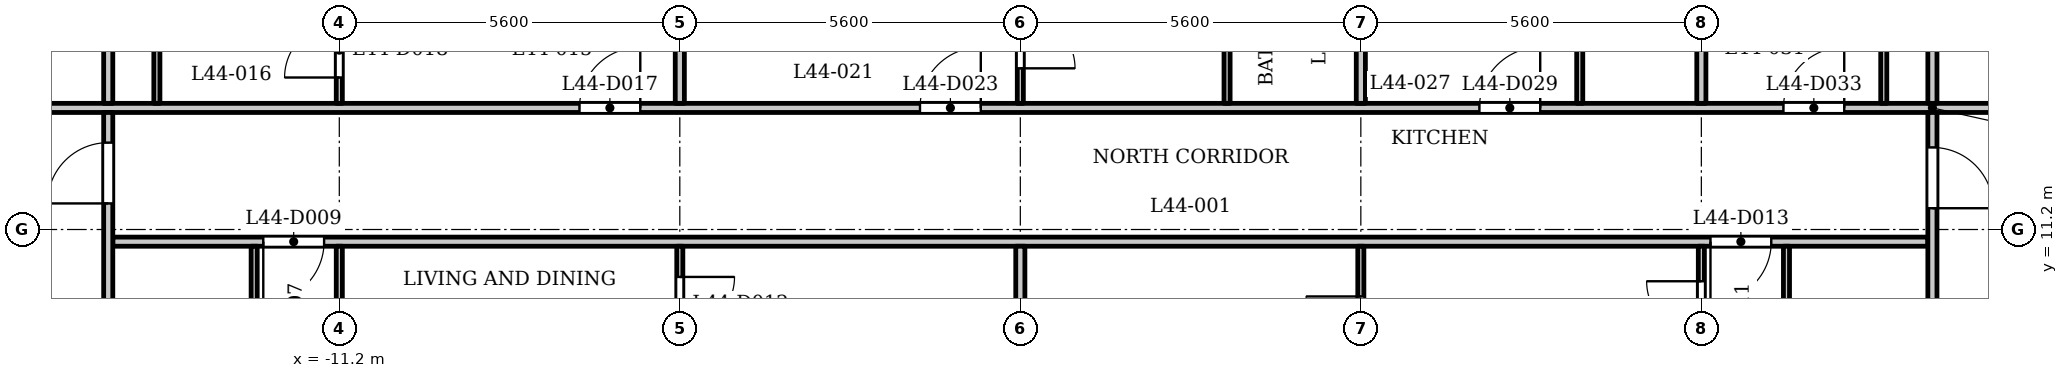
"""IFC4 building model, lengths in metres.
Left out: names, types, materials, properties, quantities, classifications, styles, units other than length and angle.
Written with IfcOpenShell. Run it as: python <this file> out.ifc"""

import sys

from ifc_helpers import new_model, si_unit, direction, frame, frame_2d, origin, place, context, subcontext, project, spatial, rectangle, extrude, element, fill, save


model = new_model("IFC4")
c1 = context("Model", 3, precision=1e-05, world=origin(), true_north=direction((0.0, 1.0)))
c2 = subcontext(c1, "Body", "Model", "MODEL_VIEW")
j1 = project(units=[si_unit("LENGTHUNIT", "METRE"), si_unit("PLANEANGLEUNIT", "RADIAN")], contexts=[c1])
p1 = place(None, origin())
s1 = spatial("IfcSite", under=j1, at=p1, CompositionType="ELEMENT")
p2 = place(p1, origin())
s2 = spatial("IfcBuilding", under=s1, at=p2, CompositionType="ELEMENT")
p3 = place(p2, frame((0.0, 0.0, 171.1)))
s3 = spatial("IfcBuildingStorey", under=s2, at=p3, CompositionType="ELEMENT", Elevation=171.1)
p4 = place(p3, frame((-14.925, 11.0, 0.0), z_axis=(0.0, 0.0, 1.0), x_axis=(1.0, 0.0, 0.0)))
e1 = element("IfcWall", 1, at=p4, inside=s3, PredefinedType="PARTITIONING", context=c2, shape_type="SweptSolid", body=[
    extrude(rectangle(XDim=29.85, YDim=0.15, at=frame_2d((14.925, 0.0))), origin(), (0.0, 0.0, 1.0), 3.2),
])
p5 = place(p4, frame((2.475, 0.0, 0.0)))
e2 = element("IfcOpeningElement", 2, at=p5, cuts=e1, PredefinedType="OPENING", context=c2, shape_type="SweptSolid", body=[
    extrude(rectangle(XDim=1.0, YDim=2.1, at=frame_2d((0.5, 1.05))), frame((0.0, 0.085, 0.0), z_axis=(0.0, -1.0, 0.0), x_axis=(1.0, 0.0, 0.0)), (0.0, 0.0, 1.0), 0.17),
])
p6 = place(p4, frame((26.275, 0.0, 0.0)))
e3 = element("IfcOpeningElement", 3, at=p6, cuts=e1, PredefinedType="OPENING", context=c2, shape_type="SweptSolid", body=[
    extrude(rectangle(XDim=1.0, YDim=2.1, at=frame_2d((0.5, 1.05))), frame((0.0, 0.085, 0.0), z_axis=(0.0, -1.0, 0.0), x_axis=(1.0, 0.0, 0.0)), (0.0, 0.0, 1.0), 0.17),
])
p7 = place(p3, frame((-17.4, 13.2, 0.0), z_axis=(0.0, 0.0, 1.0), x_axis=(1.0, 0.0, 0.0)))
e4 = element("IfcWall", 4, at=p7, inside=s3, PredefinedType="PARTITIONING", context=c2, shape_type="SweptSolid", body=[
    extrude(rectangle(XDim=34.8, YDim=0.15, at=frame_2d((17.4, 0.0))), origin(), (0.0, 0.0, 1.0), 3.2),
])
p8 = place(p7, frame((0.25, 0.0, 0.0)))
e5 = element("IfcOpeningElement", 5, at=p8, cuts=e4, PredefinedType="OPENING", context=c2, shape_type="SweptSolid", body=[
    extrude(rectangle(XDim=1.0, YDim=2.1, at=frame_2d((0.5, 1.05))), frame((0.0, 0.085, 0.0), z_axis=(0.0, -1.0, 0.0), x_axis=(1.0, 0.0, 0.0)), (0.0, 0.0, 1.0), 0.17),
])
p9 = place(p7, frame((33.65, 0.0, 0.0)))
e6 = element("IfcOpeningElement", 6, at=p9, cuts=e4, PredefinedType="OPENING", context=c2, shape_type="SweptSolid", body=[
    extrude(rectangle(XDim=1.0, YDim=2.1, at=frame_2d((0.5, 1.05))), frame((0.0, 0.085, 0.0), z_axis=(0.0, -1.0, 0.0), x_axis=(1.0, 0.0, 0.0)), (0.0, 0.0, 1.0), 0.17),
])
p10 = place(p7, frame((10.15, 0.0, 0.0)))
e7 = element("IfcOpeningElement", 7, at=p10, cuts=e4, PredefinedType="OPENING", context=c2, shape_type="SweptSolid", body=[
    extrude(rectangle(XDim=1.0, YDim=2.1, at=frame_2d((0.5, 1.05))), frame((0.0, 0.085, 0.0), z_axis=(0.0, -1.0, 0.0), x_axis=(1.0, 0.0, 0.0)), (0.0, 0.0, 1.0), 0.17),
])
p11 = place(p7, frame((15.75, 0.0, 0.0)))
e8 = element("IfcOpeningElement", 8, at=p11, cuts=e4, PredefinedType="OPENING", context=c2, shape_type="SweptSolid", body=[
    extrude(rectangle(XDim=1.0, YDim=2.1, at=frame_2d((0.5, 1.05))), frame((0.0, 0.085, 0.0), z_axis=(0.0, -1.0, 0.0), x_axis=(1.0, 0.0, 0.0)), (0.0, 0.0, 1.0), 0.17),
])
p12 = place(p7, frame((24.95, 0.0, 0.0)))
e9 = element("IfcOpeningElement", 9, at=p12, cuts=e4, PredefinedType="OPENING", context=c2, shape_type="SweptSolid", body=[
    extrude(rectangle(XDim=1.0, YDim=2.1, at=frame_2d((0.5, 1.05))), frame((0.0, 0.085, 0.0), z_axis=(0.0, -1.0, 0.0), x_axis=(1.0, 0.0, 0.0)), (0.0, 0.0, 1.0), 0.17),
])
p13 = place(p7, frame((29.95, 0.0, 0.0)))
e10 = element("IfcOpeningElement", 10, at=p13, cuts=e4, PredefinedType="OPENING", context=c2, shape_type="SweptSolid", body=[
    extrude(rectangle(XDim=1.0, YDim=2.1, at=frame_2d((0.5, 1.05))), frame((0.0, 0.085, 0.0), z_axis=(0.0, -1.0, 0.0), x_axis=(1.0, 0.0, 0.0)), (0.0, 0.0, 1.0), 0.17),
])
p14 = place(p3, frame((-15.0, 6.769, 0.0), z_axis=(0.0, 0.0, 1.0), x_axis=(0.0, 1.0, 0.0)))
e11 = element("IfcWall", 11, at=p14, inside=s3, PredefinedType="PARTITIONING", context=c2, shape_type="SweptSolid", body=[
    extrude(rectangle(XDim=6.356, YDim=0.15, at=frame_2d((3.178, 0.0))), origin(), (0.0, 0.0, 1.0), 3.2),
])
p15 = place(p14, frame((4.86, 0.0, 0.0)))
e12 = element("IfcOpeningElement", 12, at=p15, cuts=e11, PredefinedType="OPENING", context=c2, shape_type="SweptSolid", body=[
    extrude(rectangle(XDim=1.0, YDim=2.1, at=frame_2d((0.5, 1.05))), frame((0.0, 0.085, 0.0), z_axis=(0.0, -1.0, 0.0), x_axis=(1.0, 0.0, 0.0)), (0.0, 0.0, 1.0), 0.17),
])
p16 = place(p3, frame((-15.0, 13.275, 0.0), z_axis=(0.0, 0.0, 1.0), x_axis=(0.0, 1.0, 0.0)))
e13 = element("IfcWall", 13, at=p16, inside=s3, PredefinedType="PARTITIONING", context=c2, shape_type="SweptSolid", body=[
    extrude(rectangle(XDim=2.05, YDim=0.15, at=frame_2d((1.025, 0.0))), origin(), (0.0, 0.0, 1.0), 3.2),
])
p17 = place(p3, frame((-14.2, 13.275, 0.0), z_axis=(0.0, 0.0, 1.0), x_axis=(0.0, 1.0, 0.0)))
e14 = element("IfcWall", 14, at=p17, inside=s3, PredefinedType="PARTITIONING", context=c2, shape_type="SweptSolid", body=[
    extrude(rectangle(XDim=3.175, YDim=0.1, at=frame_2d((1.587, 0.0))), origin(), (0.0, 0.0, 1.0), 3.2),
])
p18 = place(p3, frame((-12.6, 7.32, 0.0), z_axis=(0.0, 0.0, 1.0), x_axis=(0.0, 1.0, 0.0)))
e15 = element("IfcWall", 15, at=p18, inside=s3, PredefinedType="PARTITIONING", context=c2, shape_type="SweptSolid", body=[
    extrude(rectangle(XDim=3.605, YDim=0.1, at=frame_2d((1.802, 0.0))), origin(), (0.0, 0.0, 1.0), 3.2),
])
p19 = place(p18, frame((1.729, 0.0, 0.0)))
e16 = element("IfcOpeningElement", 16, at=p19, cuts=e15, PredefinedType="OPENING", context=c2, shape_type="SweptSolid", body=[
    extrude(rectangle(XDim=0.8, YDim=2.1, at=frame_2d((0.4, 1.05))), frame((0.0, 0.06, 0.0), z_axis=(0.0, -1.0, 0.0), x_axis=(1.0, 0.0, 0.0)), (0.0, 0.0, 1.0), 0.12),
])
p20 = place(p3, frame((-11.2, 7.32, 0.0), z_axis=(0.0, 0.0, 1.0), x_axis=(0.0, 1.0, 0.0)))
e17 = element("IfcWall", 17, at=p20, inside=s3, PredefinedType="PARTITIONING", context=c2, shape_type="SweptSolid", body=[
    extrude(rectangle(XDim=3.605, YDim=0.1, at=frame_2d((1.802, 0.0))), origin(), (0.0, 0.0, 1.0), 3.2),
])
p21 = place(p20, frame((1.7, 0.0, 0.0)))
e18 = element("IfcOpeningElement", 18, at=p21, cuts=e17, PredefinedType="OPENING", context=c2, shape_type="SweptSolid", body=[
    extrude(rectangle(XDim=0.9, YDim=2.1, at=frame_2d((0.45, 1.05))), frame((0.0, 0.06, 0.0), z_axis=(0.0, -1.0, 0.0), x_axis=(1.0, 0.0, 0.0)), (0.0, 0.0, 1.0), 0.12),
])
p22 = place(p3, frame((-11.2, 13.275, 0.0), z_axis=(0.0, 0.0, 1.0), x_axis=(0.0, 1.0, 0.0)))
e19 = element("IfcWall", 19, at=p22, inside=s3, PredefinedType="PARTITIONING", context=c2, shape_type="SweptSolid", body=[
    extrude(rectangle(XDim=3.175, YDim=0.1, at=frame_2d((1.587, 0.0))), origin(), (0.0, 0.0, 1.0), 3.2),
])
p23 = place(p22, frame((0.425, 0.0, 0.0)))
e20 = element("IfcOpeningElement", 20, at=p23, cuts=e19, PredefinedType="OPENING", context=c2, shape_type="SweptSolid", body=[
    extrude(rectangle(XDim=0.9, YDim=2.1, at=frame_2d((0.45, 1.05))), frame((0.0, 0.06, 0.0), z_axis=(0.0, -1.0, 0.0), x_axis=(1.0, 0.0, 0.0)), (0.0, 0.0, 1.0), 0.12),
])
p24 = place(p3, frame((-5.6, 7.32, 0.0), z_axis=(0.0, 0.0, 1.0), x_axis=(0.0, 1.0, 0.0)))
e21 = element("IfcWall", 21, at=p24, inside=s3, PredefinedType="PARTITIONING", context=c2, shape_type="SweptSolid", body=[
    extrude(rectangle(XDim=3.605, YDim=0.1, at=frame_2d((1.802, 0.0))), origin(), (0.0, 0.0, 1.0), 3.2),
])
p25 = place(p24, frame((2.2, 0.0, 0.0)))
e22 = element("IfcOpeningElement", 22, at=p25, cuts=e21, PredefinedType="OPENING", context=c2, shape_type="SweptSolid", body=[
    extrude(rectangle(XDim=0.9, YDim=2.1, at=frame_2d((0.45, 1.05))), frame((0.0, 0.06, 0.0), z_axis=(0.0, -1.0, 0.0), x_axis=(1.0, 0.0, 0.0)), (0.0, 0.0, 1.0), 0.12),
])
p26 = place(p3, frame((-5.6, 13.275, 0.0), z_axis=(0.0, 0.0, 1.0), x_axis=(0.0, 1.0, 0.0)))
e23 = element("IfcWall", 23, at=p26, inside=s3, PredefinedType="PARTITIONING", context=c2, shape_type="SweptSolid", body=[
    extrude(rectangle(XDim=3.175, YDim=0.15, at=frame_2d((1.587, 0.0))), origin(), (0.0, 0.0, 1.0), 3.2),
])
p27 = place(p3, frame((0.0, 13.275, 0.0), z_axis=(0.0, 0.0, 1.0), x_axis=(0.0, 1.0, 0.0)))
e24 = element("IfcWall", 24, at=p27, inside=s3, PredefinedType="PARTITIONING", context=c2, shape_type="SweptSolid", body=[
    extrude(rectangle(XDim=3.175, YDim=0.1, at=frame_2d((1.587, 0.0))), origin(), (0.0, 0.0, 1.0), 3.2),
])
p28 = place(p27, frame((0.576, 0.0, 0.0)))
e25 = element("IfcOpeningElement", 25, at=p28, cuts=e24, PredefinedType="OPENING", context=c2, shape_type="SweptSolid", body=[
    extrude(rectangle(XDim=0.9, YDim=2.1, at=frame_2d((0.45, 1.05))), frame((0.0, 0.06, 0.0), z_axis=(0.0, -1.0, 0.0), x_axis=(1.0, 0.0, 0.0)), (0.0, 0.0, 1.0), 0.12),
])
p29 = place(p3, frame((0.0, 7.32, 0.0), z_axis=(0.0, 0.0, 1.0), x_axis=(0.0, 1.0, 0.0)))
e26 = element("IfcWall", 26, at=p29, inside=s3, PredefinedType="PARTITIONING", context=c2, shape_type="SweptSolid", body=[
    extrude(rectangle(XDim=3.605, YDim=0.15, at=frame_2d((1.802, 0.0))), origin(), (0.0, 0.0, 1.0), 3.2),
])
p30 = place(p3, frame((3.4, 13.275, 0.0), z_axis=(0.0, 0.0, 1.0), x_axis=(0.0, 1.0, 0.0)))
e27 = element("IfcWall", 27, at=p30, inside=s3, PredefinedType="PARTITIONING", context=c2, shape_type="SweptSolid", body=[
    extrude(rectangle(XDim=3.175, YDim=0.1, at=frame_2d((1.587, 0.0))), origin(), (0.0, 0.0, 1.0), 3.2),
])
p31 = place(p3, frame((5.6, 7.32, 0.0), z_axis=(0.0, 0.0, 1.0), x_axis=(0.0, 1.0, 0.0)))
e28 = element("IfcWall", 28, at=p31, inside=s3, PredefinedType="PARTITIONING", context=c2, shape_type="SweptSolid", body=[
    extrude(rectangle(XDim=3.605, YDim=0.1, at=frame_2d((1.802, 0.0))), origin(), (0.0, 0.0, 1.0), 3.2),
])
p32 = place(p31, frame((1.879, 0.0, 0.0)))
e29 = element("IfcOpeningElement", 29, at=p32, cuts=e28, PredefinedType="OPENING", context=c2, shape_type="SweptSolid", body=[
    extrude(rectangle(XDim=0.9, YDim=2.1, at=frame_2d((0.45, 1.05))), frame((0.0, 0.06, 0.0), z_axis=(0.0, -1.0, 0.0), x_axis=(1.0, 0.0, 0.0)), (0.0, 0.0, 1.0), 0.12),
])
p33 = place(p3, frame((5.6, 13.275, 0.0), z_axis=(0.0, 0.0, 1.0), x_axis=(0.0, 1.0, 0.0)))
e30 = element("IfcWall", 30, at=p33, inside=s3, PredefinedType="PARTITIONING", context=c2, shape_type="SweptSolid", body=[
    extrude(rectangle(XDim=3.175, YDim=0.15, at=frame_2d((1.587, 0.0))), origin(), (0.0, 0.0, 1.0), 3.2),
])
p34 = place(p3, frame((9.2, 13.275, 0.0), z_axis=(0.0, 0.0, 1.0), x_axis=(0.0, 1.0, 0.0)))
e31 = element("IfcWall", 31, at=p34, inside=s3, PredefinedType="PARTITIONING", context=c2, shape_type="SweptSolid", body=[
    extrude(rectangle(XDim=3.175, YDim=0.1, at=frame_2d((1.587, 0.0))), origin(), (0.0, 0.0, 1.0), 3.2),
])
p35 = place(p3, frame((11.2, 7.32, 0.0), z_axis=(0.0, 0.0, 1.0), x_axis=(0.0, 1.0, 0.0)))
e32 = element("IfcWall", 32, at=p35, inside=s3, PredefinedType="PARTITIONING", context=c2, shape_type="SweptSolid", body=[
    extrude(rectangle(XDim=3.605, YDim=0.1, at=frame_2d((1.802, 0.0))), origin(), (0.0, 0.0, 1.0), 3.2),
])
p36 = place(p35, frame((2.129, 0.0, 0.0)))
e33 = element("IfcOpeningElement", 33, at=p36, cuts=e32, PredefinedType="OPENING", context=c2, shape_type="SweptSolid", body=[
    extrude(rectangle(XDim=0.9, YDim=2.1, at=frame_2d((0.45, 1.05))), frame((0.0, 0.06, 0.0), z_axis=(0.0, -1.0, 0.0), x_axis=(1.0, 0.0, 0.0)), (0.0, 0.0, 1.0), 0.12),
])
p37 = place(p3, frame((11.2, 13.275, 0.0), z_axis=(0.0, 0.0, 1.0), x_axis=(0.0, 1.0, 0.0)))
e34 = element("IfcWall", 34, at=p37, inside=s3, PredefinedType="PARTITIONING", context=c2, shape_type="SweptSolid", body=[
    extrude(rectangle(XDim=3.175, YDim=0.15, at=frame_2d((1.587, 0.0))), origin(), (0.0, 0.0, 1.0), 3.2),
])
p38 = place(p3, frame((12.6, 7.32, 0.0), z_axis=(0.0, 0.0, 1.0), x_axis=(0.0, 1.0, 0.0)))
e35 = element("IfcWall", 35, at=p38, inside=s3, PredefinedType="PARTITIONING", context=c2, shape_type="SweptSolid", body=[
    extrude(rectangle(XDim=3.605, YDim=0.1, at=frame_2d((1.802, 0.0))), origin(), (0.0, 0.0, 1.0), 3.2),
])
p39 = place(p38, frame((1.7, 0.0, 0.0)))
e36 = element("IfcOpeningElement", 36, at=p39, cuts=e35, PredefinedType="OPENING", context=c2, shape_type="SweptSolid", body=[
    extrude(rectangle(XDim=0.8, YDim=2.1, at=frame_2d((0.4, 1.05))), frame((0.0, 0.06, 0.0), z_axis=(0.0, -1.0, 0.0), x_axis=(1.0, 0.0, 0.0)), (0.0, 0.0, 1.0), 0.12),
])
p40 = place(p3, frame((14.2, 13.275, 0.0), z_axis=(0.0, 0.0, 1.0), x_axis=(0.0, 1.0, 0.0)))
e37 = element("IfcWall", 37, at=p40, inside=s3, PredefinedType="PARTITIONING", context=c2, shape_type="SweptSolid", body=[
    extrude(rectangle(XDim=3.175, YDim=0.1, at=frame_2d((1.587, 0.0))), origin(), (0.0, 0.0, 1.0), 3.2),
])
p41 = place(p3, frame((15.0, 6.769, 0.0), z_axis=(0.0, 0.0, 1.0), x_axis=(0.0, 1.0, 0.0)))
e38 = element("IfcWall", 38, at=p41, inside=s3, PredefinedType="PARTITIONING", context=c2, shape_type="SweptSolid", body=[
    extrude(rectangle(XDim=6.356, YDim=0.15, at=frame_2d((3.178, 0.0))), origin(), (0.0, 0.0, 1.0), 3.2),
])
p42 = place(p41, frame((4.781, 0.0, 0.0)))
e39 = element("IfcOpeningElement", 39, at=p42, cuts=e38, PredefinedType="OPENING", context=c2, shape_type="SweptSolid", body=[
    extrude(rectangle(XDim=1.0, YDim=2.1, at=frame_2d((0.5, 1.05))), frame((0.0, 0.085, 0.0), z_axis=(0.0, -1.0, 0.0), x_axis=(1.0, 0.0, 0.0)), (0.0, 0.0, 1.0), 0.17),
])
p43 = place(p3, frame((15.0, 13.275, 0.0), z_axis=(0.0, 0.0, 1.0), x_axis=(0.0, 1.0, 0.0)))
e40 = element("IfcWall", 40, at=p43, inside=s3, PredefinedType="PARTITIONING", context=c2, shape_type="SweptSolid", body=[
    extrude(rectangle(XDim=2.05, YDim=0.15, at=frame_2d((1.025, 0.0))), origin(), (0.0, 0.0, 1.0), 3.2),
])
p44 = place(p15, origin())
e41 = element("IfcDoor", 41, at=p44, inside=s3, OperationType="SINGLE_SWING_RIGHT", PredefinedType="DOOR", context=c2, shape_type="SweptSolid", body=[
    extrude(rectangle(XDim=1.0, YDim=2.1, at=frame_2d((0.5, 1.05))), frame((0.0, 0.025, 0.0), z_axis=(0.0, -1.0, 0.0), x_axis=(1.0, 0.0, 0.0)), (0.0, 0.0, 1.0), 0.05),
])
fill(e12, e41)
p45 = place(p42, origin())
e42 = element("IfcDoor", 42, at=p45, inside=s3, OperationType="SINGLE_SWING_LEFT", PredefinedType="DOOR", context=c2, shape_type="SweptSolid", body=[
    extrude(rectangle(XDim=1.0, YDim=2.1, at=frame_2d((0.5, 1.05))), frame((0.0, 0.025, 0.0), z_axis=(0.0, -1.0, 0.0), x_axis=(1.0, 0.0, 0.0)), (0.0, 0.0, 1.0), 0.05),
])
fill(e39, e42)
p46 = place(p5, origin())
e43 = element("IfcDoor", 43, at=p46, inside=s3, OperationType="SINGLE_SWING_LEFT", PredefinedType="DOOR", context=c2, shape_type="SweptSolid", body=[
    extrude(rectangle(XDim=1.0, YDim=2.1, at=frame_2d((0.5, 1.05))), frame((0.0, 0.025, 0.0), z_axis=(0.0, -1.0, 0.0), x_axis=(1.0, 0.0, 0.0)), (0.0, 0.0, 1.0), 0.05),
])
fill(e2, e43)
p47 = place(p25, origin())
e44 = element("IfcDoor", 44, at=p47, inside=s3, OperationType="SINGLE_SWING_RIGHT", PredefinedType="DOOR", context=c2, shape_type="SweptSolid", body=[
    extrude(rectangle(XDim=0.9, YDim=2.1, at=frame_2d((0.45, 1.05))), frame((0.0, 0.025, 0.0), z_axis=(0.0, -1.0, 0.0), x_axis=(1.0, 0.0, 0.0)), (0.0, 0.0, 1.0), 0.05),
])
fill(e22, e44)
p48 = place(p6, origin())
e45 = element("IfcDoor", 45, at=p48, inside=s3, OperationType="SINGLE_SWING_LEFT", PredefinedType="DOOR", context=c2, shape_type="SweptSolid", body=[
    extrude(rectangle(XDim=1.0, YDim=2.1, at=frame_2d((0.5, 1.05))), frame((0.0, 0.025, 0.0), z_axis=(0.0, -1.0, 0.0), x_axis=(1.0, 0.0, 0.0)), (0.0, 0.0, 1.0), 0.05),
])
fill(e3, e45)
p49 = place(p36, origin())
e46 = element("IfcDoor", 46, at=p49, inside=s3, OperationType="SINGLE_SWING_LEFT", PredefinedType="DOOR", context=c2, shape_type="SweptSolid", body=[
    extrude(rectangle(XDim=0.9, YDim=2.1, at=frame_2d((0.45, 1.05))), frame((0.0, 0.025, 0.0), z_axis=(0.0, -1.0, 0.0), x_axis=(1.0, 0.0, 0.0)), (0.0, 0.0, 1.0), 0.05),
])
fill(e33, e46)
p50 = place(p32, origin())
e47 = element("IfcDoor", 47, at=p50, inside=s3, OperationType="SINGLE_SWING_LEFT", PredefinedType="DOOR", context=c2, shape_type="SweptSolid", body=[
    extrude(rectangle(XDim=0.9, YDim=2.1, at=frame_2d((0.45, 1.05))), frame((0.0, 0.025, 0.0), z_axis=(0.0, -1.0, 0.0), x_axis=(1.0, 0.0, 0.0)), (0.0, 0.0, 1.0), 0.05),
])
fill(e29, e47)
p51 = place(p10, origin())
e48 = element("IfcDoor", 48, at=p51, inside=s3, OperationType="SINGLE_SWING_LEFT", PredefinedType="DOOR", context=c2, shape_type="SweptSolid", body=[
    extrude(rectangle(XDim=1.0, YDim=2.1, at=frame_2d((0.5, 1.05))), frame((0.0, 0.025, 0.0), z_axis=(0.0, -1.0, 0.0), x_axis=(1.0, 0.0, 0.0)), (0.0, 0.0, 1.0), 0.05),
])
fill(e7, e48)
p52 = place(p23, origin())
e49 = element("IfcDoor", 49, at=p52, inside=s3, OperationType="SINGLE_SWING_RIGHT", PredefinedType="DOOR", context=c2, shape_type="SweptSolid", body=[
    extrude(rectangle(XDim=0.9, YDim=2.1, at=frame_2d((0.45, 1.05))), frame((0.0, 0.025, 0.0), z_axis=(0.0, -1.0, 0.0), x_axis=(1.0, 0.0, 0.0)), (0.0, 0.0, 1.0), 0.05),
])
fill(e20, e49)
p53 = place(p11, origin())
e50 = element("IfcDoor", 50, at=p53, inside=s3, OperationType="SINGLE_SWING_LEFT", PredefinedType="DOOR", context=c2, shape_type="SweptSolid", body=[
    extrude(rectangle(XDim=1.0, YDim=2.1, at=frame_2d((0.5, 1.05))), frame((0.0, 0.025, 0.0), z_axis=(0.0, -1.0, 0.0), x_axis=(1.0, 0.0, 0.0)), (0.0, 0.0, 1.0), 0.05),
])
fill(e8, e50)
p54 = place(p28, origin())
e51 = element("IfcDoor", 51, at=p54, inside=s3, OperationType="SINGLE_SWING_LEFT", PredefinedType="DOOR", context=c2, shape_type="SweptSolid", body=[
    extrude(rectangle(XDim=0.9, YDim=2.1, at=frame_2d((0.45, 1.05))), frame((0.0, 0.025, 0.0), z_axis=(0.0, -1.0, 0.0), x_axis=(1.0, 0.0, 0.0)), (0.0, 0.0, 1.0), 0.05),
])
fill(e25, e51)
p55 = place(p12, origin())
e52 = element("IfcDoor", 52, at=p55, inside=s3, OperationType="SINGLE_SWING_LEFT", PredefinedType="DOOR", context=c2, shape_type="SweptSolid", body=[
    extrude(rectangle(XDim=1.0, YDim=2.1, at=frame_2d((0.5, 1.05))), frame((0.0, 0.025, 0.0), z_axis=(0.0, -1.0, 0.0), x_axis=(1.0, 0.0, 0.0)), (0.0, 0.0, 1.0), 0.05),
])
fill(e9, e52)
p56 = place(p13, origin())
e53 = element("IfcDoor", 53, at=p56, inside=s3, OperationType="SINGLE_SWING_LEFT", PredefinedType="DOOR", context=c2, shape_type="SweptSolid", body=[
    extrude(rectangle(XDim=1.0, YDim=2.1, at=frame_2d((0.5, 1.05))), frame((0.0, 0.025, 0.0), z_axis=(0.0, -1.0, 0.0), x_axis=(1.0, 0.0, 0.0)), (0.0, 0.0, 1.0), 0.05),
])
fill(e10, e53)
save(model, sys.argv[1])
